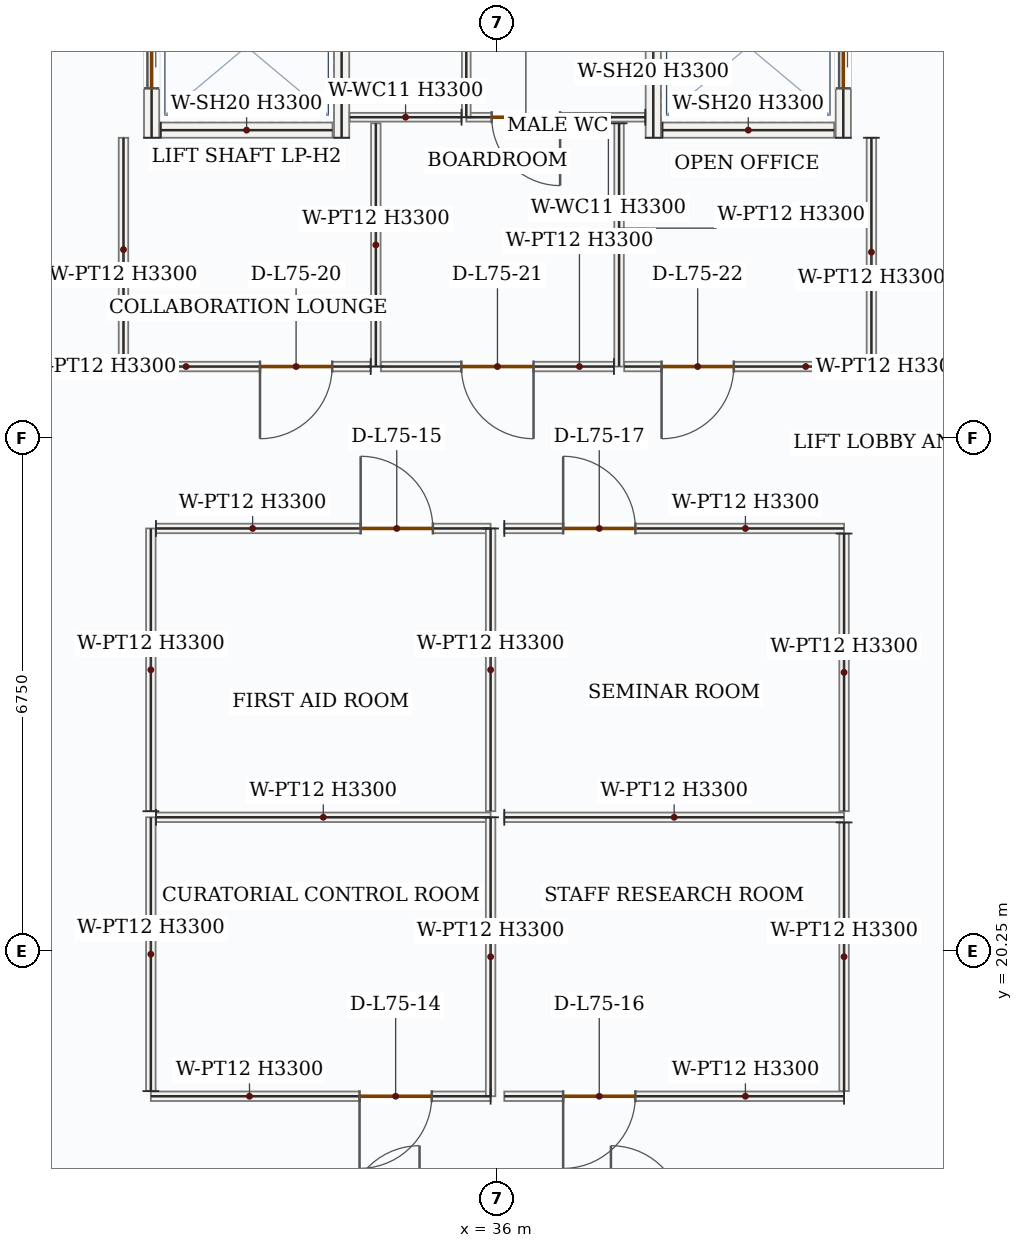
"""IFC4 building model, lengths in metres.
Left out: names, types, materials, properties, quantities, classifications, styles, units other than length and angle.
Written with IfcOpenShell. Run it as: python <this file> out.ifc"""

import sys

from ifc_helpers import new_model, si_unit, direction, frame, frame_2d, origin, place, context, subcontext, project, spatial, rectangle, extrude, source, transform, mapped, element, fill, save


model = new_model("IFC4")
c1 = context("Model", 3, precision=1e-05, world=origin(), true_north=direction((0.0, 1.0)))
c2 = subcontext(c1, "Body", "Model", "MODEL_VIEW")
j1 = project(units=[si_unit("LENGTHUNIT", "METRE"), si_unit("PLANEANGLEUNIT", "RADIAN")], contexts=[c1])
p1 = place(None, origin())
s1 = spatial("IfcSite", under=j1, at=p1, CompositionType="ELEMENT")
p2 = place(p1, origin())
s2 = spatial("IfcBuilding", under=s1, at=p2, CompositionType="ELEMENT")
p3 = place(p2, frame((0.0, 0.0, 310.35)))
s3 = spatial("IfcBuildingStorey", under=s2, at=p3, CompositionType="ELEMENT", Elevation=310.35)
p4 = place(p3, frame((31.45, 30.95, 0.0), z_axis=(0.0, 0.0, 1.0), x_axis=(0.0, 1.0, 0.0)))
e1 = element("IfcWall", 1, at=p4, inside=s3, PredefinedType="SOLIDWALL", context=c2, shape_type="SweptSolid", body=[
    extrude(rectangle(XDim=2.4, YDim=0.2, at=frame_2d((1.2, 0.0))), origin(), (0.0, 0.0, 1.0), 3.3),
])
p5 = place(p4, frame((0.65, 0.0, 0.0)))
e2 = element("IfcOpeningElement", 2, at=p5, cuts=e1, PredefinedType="OPENING", context=c2, shape_type="SweptSolid", body=[
    extrude(rectangle(XDim=1.1, YDim=2.15, at=frame_2d((0.55, 1.075))), frame((0.0, 0.11, 0.0), z_axis=(0.0, -1.0, 0.0), x_axis=(1.0, 0.0, 0.0)), (0.0, 0.0, 1.0), 0.22),
])
m1 = source(origin(), c2, "Body", "SweptSolid", [
    extrude(rectangle(XDim=2.4, YDim=0.2, at=frame_2d((1.2, 0.0))), origin(), (0.0, 0.0, 1.0), 3.3),
])
p6 = place(p3, frame((33.95, 30.95, 0.0), z_axis=(0.0, 0.0, 1.0), x_axis=(0.0, 1.0, 0.0)))
e3 = element("IfcWall", 3, at=p6, inside=s3, PredefinedType="SOLIDWALL", context=c2, shape_type="MappedRepresentation", body=[
    mapped(m1, transform((0.0, 0.0, 0.0), x_axis=(1.0, 0.0, 0.0), y_axis=(0.0, 1.0, 0.0), z_axis=(0.0, 0.0, 1.0), scale=1.0)),
])
m2 = source(origin(), c2, "Body", "SweptSolid", [
    extrude(rectangle(XDim=2.26, YDim=0.2, at=frame_2d((1.13, 0.0))), origin(), (0.0, 0.0, 1.0), 3.3),
])
p7 = place(p3, frame((31.57, 31.05, 0.0), z_axis=(0.0, 0.0, 1.0), x_axis=(1.0, 0.0, 0.0)))
e4 = element("IfcWall", 4, at=p7, inside=s3, PredefinedType="SOLIDWALL", context=c2, shape_type="MappedRepresentation", body=[
    mapped(m2, transform((0.0, 0.0, 0.0), x_axis=(1.0, 0.0, 0.0), y_axis=(0.0, 1.0, 0.0), z_axis=(0.0, 0.0, 1.0), scale=1.0)),
])
p8 = place(p3, frame((38.05, 30.95, 0.0), z_axis=(0.0, 0.0, 1.0), x_axis=(0.0, 1.0, 0.0)))
e5 = element("IfcWall", 5, at=p8, inside=s3, PredefinedType="SOLIDWALL", context=c2, shape_type="MappedRepresentation", body=[
    mapped(m1, transform((0.0, 0.0, 0.0), x_axis=(1.0, 0.0, 0.0), y_axis=(0.0, 1.0, 0.0), z_axis=(0.0, 0.0, 1.0), scale=1.0)),
])
p9 = place(p3, frame((40.55, 30.95, 0.0), z_axis=(0.0, 0.0, 1.0), x_axis=(0.0, 1.0, 0.0)))
e6 = element("IfcWall", 6, at=p9, inside=s3, PredefinedType="SOLIDWALL", context=c2, shape_type="SweptSolid", body=[
    extrude(rectangle(XDim=2.4, YDim=0.2, at=frame_2d((1.2, 0.0))), origin(), (0.0, 0.0, 1.0), 3.3),
])
p10 = place(p9, frame((0.65, 0.0, 0.0)))
e7 = element("IfcOpeningElement", 7, at=p10, cuts=e6, PredefinedType="OPENING", context=c2, shape_type="SweptSolid", body=[
    extrude(rectangle(XDim=1.1, YDim=2.15, at=frame_2d((0.55, 1.075))), frame((0.0, 0.11, 0.0), z_axis=(0.0, -1.0, 0.0), x_axis=(1.0, 0.0, 0.0)), (0.0, 0.0, 1.0), 0.22),
])
p11 = place(p3, frame((38.17, 31.05, 0.0), z_axis=(0.0, 0.0, 1.0), x_axis=(1.0, 0.0, 0.0)))
e8 = element("IfcWall", 8, at=p11, inside=s3, PredefinedType="SOLIDWALL", context=c2, shape_type="MappedRepresentation", body=[
    mapped(m2, transform((0.0, 0.0, 0.0), x_axis=(1.0, 0.0, 0.0), y_axis=(0.0, 1.0, 0.0), z_axis=(0.0, 0.0, 1.0), scale=1.0)),
])
p12 = place(p3, frame((37.945, 31.22, 0.0), z_axis=(0.0, 0.0, 1.0), x_axis=(-1.0, 0.0, 0.0)))
e9 = element("IfcWall", 9, at=p12, inside=s3, PredefinedType="PARTITIONING", context=c2, shape_type="SweptSolid", body=[
    extrude(rectangle(XDim=2.355, YDim=0.115, at=frame_2d((1.177, 0.0))), origin(), (0.0, 0.0, 1.0), 3.3),
])
p13 = place(p12, frame((1.121, 0.0, 0.0)))
e10 = element("IfcOpeningElement", 10, at=p13, cuts=e9, PredefinedType="OPENING", context=c2, shape_type="SweptSolid", body=[
    extrude(rectangle(XDim=0.9, YDim=2.1, at=frame_2d((0.45, 1.05))), frame((0.0, 0.067, 0.0), z_axis=(0.0, -1.0, 0.0), x_axis=(1.0, 0.0, 0.0)), (0.0, 0.0, 1.0), 0.135),
])
m3 = source(origin(), c2, "Body", "SweptSolid", [
    extrude(rectangle(XDim=1.96, YDim=0.115, at=frame_2d((0.98, 0.0))), origin(), (0.0, 0.0, 1.0), 3.3),
])
p14 = place(p3, frame((35.59, 31.22, 0.0), z_axis=(0.0, 0.0, 1.0), x_axis=(0.0, 1.0, 0.0)))
e11 = element("IfcWall", 11, at=p14, inside=s3, PredefinedType="PARTITIONING", context=c2, shape_type="MappedRepresentation", body=[
    mapped(m3, transform((0.0, 0.0, 0.0), x_axis=(1.0, 0.0, 0.0), y_axis=(0.0, 1.0, 0.0), z_axis=(0.0, 0.0, 1.0), scale=1.0)),
])
m4 = source(origin(), c2, "Body", "SweptSolid", [
    extrude(rectangle(XDim=1.473, YDim=0.115, at=frame_2d((0.736, 0.0))), origin(), (0.0, 0.0, 1.0), 3.3),
])
p15 = place(p3, frame((35.528, 31.22, 0.0), z_axis=(0.0, 0.0, 1.0), x_axis=(-1.0, 0.0, 0.0)))
e12 = element("IfcWall", 12, at=p15, inside=s3, PredefinedType="PARTITIONING", context=c2, shape_type="MappedRepresentation", body=[
    mapped(m4, transform((0.0, 0.0, 0.0), x_axis=(1.0, 0.0, 0.0), y_axis=(0.0, 1.0, 0.0), z_axis=(0.0, 0.0, 1.0), scale=1.0)),
])
m5 = source(origin(), c2, "Body", "SweptSolid", [
    extrude(rectangle(XDim=3.2, YDim=0.125, at=frame_2d((1.6, 0.0))), origin(), (0.0, 0.0, 1.0), 3.3),
])
for number, where, z_axis, x_axis in (
    (13, (34.4, 27.94, 0.0), (0.0, 0.0, 1.0), (0.0, 1.0, 0.0)),
    (14, (37.6, 31.14, 0.0), (0.0, 0.0, 1.0), (0.0, -1.0, 0.0)),
):
    element("IfcWall", number, at=place(p3, frame(where, z_axis=z_axis, x_axis=x_axis)), inside=s3, PredefinedType="PARTITIONING", context=c2, shape_type="MappedRepresentation", body=[
        mapped(m5, transform((0.0, 0.0, 0.0), x_axis=(1.0, 0.0, 0.0), y_axis=(0.0, 1.0, 0.0), z_axis=(0.0, 0.0, 1.0), scale=1.0)),
    ])
p16 = place(p3, frame((37.532, 27.94, 0.0), z_axis=(0.0, 0.0, 1.0), x_axis=(-1.0, 0.0, 0.0)))
e15 = element("IfcWall", 15, at=p16, inside=s3, PredefinedType="PARTITIONING", context=c2, shape_type="SweptSolid", body=[
    extrude(rectangle(XDim=3.065, YDim=0.125, at=frame_2d((1.532, 0.0))), origin(), (0.0, 0.0, 1.0), 3.3),
])
p17 = place(p16, frame((1.058, 0.0, 0.0)))
e16 = element("IfcOpeningElement", 16, at=p17, cuts=e15, PredefinedType="OPENING", context=c2, shape_type="SweptSolid", body=[
    extrude(rectangle(XDim=0.95, YDim=2.15, at=frame_2d((0.475, 1.075))), frame((0.0, 0.073, 0.0), z_axis=(0.0, -1.0, 0.0), x_axis=(1.0, 0.0, 0.0)), (0.0, 0.0, 1.0), 0.145),
])
p18 = place(p3, frame((34.333, 27.94, 0.0), z_axis=(0.0, 0.0, 1.0), x_axis=(-1.0, 0.0, 0.0)))
e17 = element("IfcWall", 17, at=p18, inside=s3, PredefinedType="PARTITIONING", context=c2, shape_type="SweptSolid", body=[
    extrude(rectangle(XDim=3.252, YDim=0.125, at=frame_2d((1.626, 0.0))), origin(), (0.0, 0.0, 1.0), 3.3),
])
p19 = place(p18, frame((0.507, 0.0, 0.0)))
e18 = element("IfcOpeningElement", 18, at=p19, cuts=e17, PredefinedType="OPENING", context=c2, shape_type="SweptSolid", body=[
    extrude(rectangle(XDim=0.95, YDim=2.15, at=frame_2d((0.475, 1.075))), frame((0.0, 0.073, 0.0), z_axis=(0.0, -1.0, 0.0), x_axis=(1.0, 0.0, 0.0)), (0.0, 0.0, 1.0), 0.145),
])
m6 = source(origin(), c2, "Body", "SweptSolid", [
    extrude(rectangle(XDim=2.942, YDim=0.125, at=frame_2d((1.471, 0.0))), origin(), (0.0, 0.0, 1.0), 3.3),
])
p20 = place(p3, frame((31.08, 28.008, 0.0), z_axis=(0.0, 0.0, 1.0), x_axis=(0.0, 1.0, 0.0)))
e19 = element("IfcWall", 19, at=p20, inside=s3, PredefinedType="PARTITIONING", context=c2, shape_type="MappedRepresentation", body=[
    mapped(m6, transform((0.0, 0.0, 0.0), x_axis=(1.0, 0.0, 0.0), y_axis=(0.0, 1.0, 0.0), z_axis=(0.0, 0.0, 1.0), scale=1.0)),
])
m7 = source(origin(), c2, "Body", "SweptSolid", [
    extrude(rectangle(XDim=3.01, YDim=0.125, at=frame_2d((1.505, 0.0))), origin(), (0.0, 0.0, 1.0), 3.3),
])
p21 = place(p3, frame((40.92, 30.95, 0.0), z_axis=(0.0, 0.0, 1.0), x_axis=(0.0, -1.0, 0.0)))
e20 = element("IfcWall", 20, at=p21, inside=s3, PredefinedType="PARTITIONING", context=c2, shape_type="MappedRepresentation", body=[
    mapped(m7, transform((0.0, 0.0, 0.0), x_axis=(1.0, 0.0, 0.0), y_axis=(0.0, 1.0, 0.0), z_axis=(0.0, 0.0, 1.0), scale=1.0)),
])
p22 = place(p3, frame((40.853, 27.94, 0.0), z_axis=(0.0, 0.0, 1.0), x_axis=(-1.0, 0.0, 0.0)))
e21 = element("IfcWall", 21, at=p22, inside=s3, PredefinedType="PARTITIONING", context=c2, shape_type="SweptSolid", body=[
    extrude(rectangle(XDim=3.185, YDim=0.125, at=frame_2d((1.593, 0.0))), origin(), (0.0, 0.0, 1.0), 3.3),
])
p23 = place(p22, frame((1.743, 0.0, 0.0)))
e22 = element("IfcOpeningElement", 22, at=p23, cuts=e21, PredefinedType="OPENING", context=c2, shape_type="SweptSolid", body=[
    extrude(rectangle(XDim=0.95, YDim=2.15, at=frame_2d((0.475, 1.075))), frame((0.0, 0.073, 0.0), z_axis=(0.0, -1.0, 0.0), x_axis=(1.0, 0.0, 0.0)), (0.0, 0.0, 1.0), 0.145),
])
p24 = place(p3, frame((35.91, 18.34, 0.0), z_axis=(0.0, 0.0, 1.0), x_axis=(-1.0, 0.0, 0.0)))
e23 = element("IfcWall", 23, at=p24, inside=s3, PredefinedType="PARTITIONING", context=c2, shape_type="SweptSolid", body=[
    extrude(rectangle(XDim=4.47, YDim=0.125, at=frame_2d((2.235, 0.0))), origin(), (0.0, 0.0, 1.0), 3.3),
])
p25 = place(p24, frame((0.774, 0.0, 0.0)))
e24 = element("IfcOpeningElement", 24, at=p25, cuts=e23, PredefinedType="OPENING", context=c2, shape_type="SweptSolid", body=[
    extrude(rectangle(XDim=0.95, YDim=2.15, at=frame_2d((0.475, 1.075))), frame((0.0, 0.073, 0.0), z_axis=(0.0, -1.0, 0.0), x_axis=(1.0, 0.0, 0.0)), (0.0, 0.0, 1.0), 0.145),
])
m8 = source(origin(), c2, "Body", "SweptSolid", [
    extrude(rectangle(XDim=3.603, YDim=0.125, at=frame_2d((1.801, 0.0))), origin(), (0.0, 0.0, 1.0), 3.3),
])
p26 = place(p3, frame((31.44, 18.407, 0.0), z_axis=(0.0, 0.0, 1.0), x_axis=(0.0, 1.0, 0.0)))
e25 = element("IfcWall", 25, at=p26, inside=s3, PredefinedType="PARTITIONING", context=c2, shape_type="MappedRepresentation", body=[
    mapped(m8, transform((0.0, 0.0, 0.0), x_axis=(1.0, 0.0, 0.0), y_axis=(0.0, 1.0, 0.0), z_axis=(0.0, 0.0, 1.0), scale=1.0)),
])
m9 = source(origin(), c2, "Body", "SweptSolid", [
    extrude(rectangle(XDim=4.402, YDim=0.125, at=frame_2d((2.201, 0.0))), origin(), (0.0, 0.0, 1.0), 3.3),
])
p27 = place(p3, frame((31.508, 22.01, 0.0), z_axis=(0.0, 0.0, 1.0), x_axis=(1.0, 0.0, 0.0)))
e26 = element("IfcWall", 26, at=p27, inside=s3, PredefinedType="PARTITIONING", context=c2, shape_type="MappedRepresentation", body=[
    mapped(m9, transform((0.0, 0.0, 0.0), x_axis=(1.0, 0.0, 0.0), y_axis=(0.0, 1.0, 0.0), z_axis=(0.0, 0.0, 1.0), scale=1.0)),
])
m10 = source(origin(), c2, "Body", "SweptSolid", [
    extrude(rectangle(XDim=3.67, YDim=0.125, at=frame_2d((1.835, 0.0))), origin(), (0.0, 0.0, 1.0), 3.3),
])
p28 = place(p3, frame((35.91, 22.01, 0.0), z_axis=(0.0, 0.0, 1.0), x_axis=(0.0, -1.0, 0.0)))
e27 = element("IfcWall", 27, at=p28, inside=s3, PredefinedType="PARTITIONING", context=c2, shape_type="MappedRepresentation", body=[
    mapped(m10, transform((0.0, 0.0, 0.0), x_axis=(1.0, 0.0, 0.0), y_axis=(0.0, 1.0, 0.0), z_axis=(0.0, 0.0, 1.0), scale=1.0)),
])
p29 = place(p3, frame((40.56, 18.34, 0.0), z_axis=(0.0, 0.0, 1.0), x_axis=(-1.0, 0.0, 0.0)))
e28 = element("IfcWall", 28, at=p29, inside=s3, PredefinedType="PARTITIONING", context=c2, shape_type="SweptSolid", body=[
    extrude(rectangle(XDim=4.47, YDim=0.125, at=frame_2d((2.235, 0.0))), origin(), (0.0, 0.0, 1.0), 3.3),
])
p30 = place(p29, frame((2.746, 0.0, 0.0)))
e29 = element("IfcOpeningElement", 29, at=p30, cuts=e28, PredefinedType="OPENING", context=c2, shape_type="SweptSolid", body=[
    extrude(rectangle(XDim=0.95, YDim=2.15, at=frame_2d((0.475, 1.075))), frame((0.0, 0.073, 0.0), z_axis=(0.0, -1.0, 0.0), x_axis=(1.0, 0.0, 0.0)), (0.0, 0.0, 1.0), 0.145),
])
m11 = source(origin(), c2, "Body", "SweptSolid", [
    extrude(rectangle(XDim=4.47, YDim=0.125, at=frame_2d((2.235, 0.0))), origin(), (0.0, 0.0, 1.0), 3.3),
])
p31 = place(p3, frame((36.09, 22.01, 0.0), z_axis=(0.0, 0.0, 1.0), x_axis=(1.0, 0.0, 0.0)))
e30 = element("IfcWall", 30, at=p31, inside=s3, PredefinedType="PARTITIONING", context=c2, shape_type="MappedRepresentation", body=[
    mapped(m11, transform((0.0, 0.0, 0.0), x_axis=(1.0, 0.0, 0.0), y_axis=(0.0, 1.0, 0.0), z_axis=(0.0, 0.0, 1.0), scale=1.0)),
])
m12 = source(origin(), c2, "Body", "SweptSolid", [
    extrude(rectangle(XDim=3.535, YDim=0.125, at=frame_2d((1.768, 0.0))), origin(), (0.0, 0.0, 1.0), 3.3),
])
p32 = place(p3, frame((40.56, 21.942, 0.0), z_axis=(0.0, 0.0, 1.0), x_axis=(0.0, -1.0, 0.0)))
e31 = element("IfcWall", 31, at=p32, inside=s3, PredefinedType="PARTITIONING", context=c2, shape_type="MappedRepresentation", body=[
    mapped(m12, transform((0.0, 0.0, 0.0), x_axis=(1.0, 0.0, 0.0), y_axis=(0.0, 1.0, 0.0), z_axis=(0.0, 0.0, 1.0), scale=1.0)),
])
m13 = source(origin(), c2, "Body", "SweptSolid", [
    extrude(rectangle(XDim=3.72, YDim=0.125, at=frame_2d((1.86, 0.0))), origin(), (0.0, 0.0, 1.0), 3.3),
])
p33 = place(p3, frame((31.44, 22.09, 0.0), z_axis=(0.0, 0.0, 1.0), x_axis=(0.0, 1.0, 0.0)))
e32 = element("IfcWall", 32, at=p33, inside=s3, PredefinedType="PARTITIONING", context=c2, shape_type="MappedRepresentation", body=[
    mapped(m13, transform((0.0, 0.0, 0.0), x_axis=(1.0, 0.0, 0.0), y_axis=(0.0, 1.0, 0.0), z_axis=(0.0, 0.0, 1.0), scale=1.0)),
])
p34 = place(p3, frame((31.508, 25.81, 0.0), z_axis=(0.0, 0.0, 1.0), x_axis=(1.0, 0.0, 0.0)))
e33 = element("IfcWall", 33, at=p34, inside=s3, PredefinedType="PARTITIONING", context=c2, shape_type="SweptSolid", body=[
    extrude(rectangle(XDim=4.402, YDim=0.125, at=frame_2d((2.201, 0.0))), origin(), (0.0, 0.0, 1.0), 3.3),
])
p35 = place(p34, frame((2.693, 0.0, 0.0)))
e34 = element("IfcOpeningElement", 34, at=p35, cuts=e33, PredefinedType="OPENING", context=c2, shape_type="SweptSolid", body=[
    extrude(rectangle(XDim=0.95, YDim=2.15, at=frame_2d((0.475, 1.075))), frame((0.0, 0.073, 0.0), z_axis=(0.0, -1.0, 0.0), x_axis=(1.0, 0.0, 0.0)), (0.0, 0.0, 1.0), 0.145),
])
p36 = place(p3, frame((35.91, 25.81, 0.0), z_axis=(0.0, 0.0, 1.0), x_axis=(0.0, -1.0, 0.0)))
e35 = element("IfcWall", 35, at=p36, inside=s3, PredefinedType="PARTITIONING", context=c2, shape_type="MappedRepresentation", body=[
    mapped(m13, transform((0.0, 0.0, 0.0), x_axis=(1.0, 0.0, 0.0), y_axis=(0.0, 1.0, 0.0), z_axis=(0.0, 0.0, 1.0), scale=1.0)),
])
p37 = place(p3, frame((36.09, 25.81, 0.0), z_axis=(0.0, 0.0, 1.0), x_axis=(1.0, 0.0, 0.0)))
e36 = element("IfcWall", 36, at=p37, inside=s3, PredefinedType="PARTITIONING", context=c2, shape_type="SweptSolid", body=[
    extrude(rectangle(XDim=4.47, YDim=0.125, at=frame_2d((2.235, 0.0))), origin(), (0.0, 0.0, 1.0), 3.3),
])
p38 = place(p37, frame((0.774, 0.0, 0.0)))
e37 = element("IfcOpeningElement", 37, at=p38, cuts=e36, PredefinedType="OPENING", context=c2, shape_type="SweptSolid", body=[
    extrude(rectangle(XDim=0.95, YDim=2.15, at=frame_2d((0.475, 1.075))), frame((0.0, 0.073, 0.0), z_axis=(0.0, -1.0, 0.0), x_axis=(1.0, 0.0, 0.0)), (0.0, 0.0, 1.0), 0.145),
])
m14 = source(origin(), c2, "Body", "SweptSolid", [
    extrude(rectangle(XDim=3.652, YDim=0.125, at=frame_2d((1.826, 0.0))), origin(), (0.0, 0.0, 1.0), 3.3),
])
p39 = place(p3, frame((40.56, 25.742, 0.0), z_axis=(0.0, 0.0, 1.0), x_axis=(0.0, -1.0, 0.0)))
e38 = element("IfcWall", 38, at=p39, inside=s3, PredefinedType="PARTITIONING", context=c2, shape_type="MappedRepresentation", body=[
    mapped(m14, transform((0.0, 0.0, 0.0), x_axis=(1.0, 0.0, 0.0), y_axis=(0.0, 1.0, 0.0), z_axis=(0.0, 0.0, 1.0), scale=1.0)),
])
m15 = source(origin(), c2, "Body", "SweptSolid", [
    extrude(rectangle(XDim=1.1, YDim=2.15, at=frame_2d((0.55, 1.075))), frame((0.0, 0.025, 0.0), z_axis=(0.0, -1.0, 0.0), x_axis=(1.0, 0.0, 0.0)), (0.0, 0.0, 1.0), 0.05),
])
p40 = place(p5, origin())
e39 = element("IfcDoor", 39, at=p40, inside=s3, OperationType="DOUBLE_DOOR_SLIDING", PredefinedType="DOOR", context=c2, shape_type="MappedRepresentation", body=[
    mapped(m15, transform((0.0, 0.0, 0.0), x_axis=(1.0, 0.0, 0.0), y_axis=(0.0, 1.0, 0.0), z_axis=(0.0, 0.0, 1.0), scale=1.0)),
])
fill(e2, e39)
p41 = place(p10, origin())
e40 = element("IfcDoor", 40, at=p41, inside=s3, OperationType="DOUBLE_DOOR_SLIDING", PredefinedType="DOOR", context=c2, shape_type="MappedRepresentation", body=[
    mapped(m15, transform((0.0, 0.0, 0.0), x_axis=(1.0, 0.0, 0.0), y_axis=(0.0, 1.0, 0.0), z_axis=(0.0, 0.0, 1.0), scale=1.0)),
])
fill(e7, e40)
m16 = source(origin(), c2, "Body", "SweptSolid", [
    extrude(rectangle(XDim=0.95, YDim=2.15, at=frame_2d((0.475, 1.075))), frame((0.0, 0.025, 0.0), z_axis=(0.0, -1.0, 0.0), x_axis=(1.0, 0.0, 0.0)), (0.0, 0.0, 1.0), 0.05),
])
p42 = place(p25, origin())
e41 = element("IfcDoor", 41, at=p42, inside=s3, OperationType="SINGLE_SWING_RIGHT", PredefinedType="DOOR", context=c2, shape_type="MappedRepresentation", body=[
    mapped(m16, transform((0.0, 0.0, 0.0), x_axis=(1.0, 0.0, 0.0), y_axis=(0.0, 1.0, 0.0), z_axis=(0.0, 0.0, 1.0), scale=1.0)),
])
fill(e24, e41)
p43 = place(p35, origin())
e42 = element("IfcDoor", 42, at=p43, inside=s3, OperationType="SINGLE_SWING_LEFT", PredefinedType="DOOR", context=c2, shape_type="MappedRepresentation", body=[
    mapped(m16, transform((0.0, 0.0, 0.0), x_axis=(1.0, 0.0, 0.0), y_axis=(0.0, 1.0, 0.0), z_axis=(0.0, 0.0, 1.0), scale=1.0)),
])
fill(e34, e42)
p44 = place(p30, origin())
e43 = element("IfcDoor", 43, at=p44, inside=s3, OperationType="SINGLE_SWING_RIGHT", PredefinedType="DOOR", context=c2, shape_type="MappedRepresentation", body=[
    mapped(m16, transform((0.0, 0.0, 0.0), x_axis=(1.0, 0.0, 0.0), y_axis=(0.0, 1.0, 0.0), z_axis=(0.0, 0.0, 1.0), scale=1.0)),
])
fill(e29, e43)
p45 = place(p38, origin())
e44 = element("IfcDoor", 44, at=p45, inside=s3, OperationType="SINGLE_SWING_LEFT", PredefinedType="DOOR", context=c2, shape_type="MappedRepresentation", body=[
    mapped(m16, transform((0.0, 0.0, 0.0), x_axis=(1.0, 0.0, 0.0), y_axis=(0.0, 1.0, 0.0), z_axis=(0.0, 0.0, 1.0), scale=1.0)),
])
fill(e37, e44)
p46 = place(p19, origin())
e45 = element("IfcDoor", 45, at=p46, inside=s3, OperationType="SINGLE_SWING_RIGHT", PredefinedType="DOOR", context=c2, shape_type="MappedRepresentation", body=[
    mapped(m16, transform((0.0, 0.0, 0.0), x_axis=(1.0, 0.0, 0.0), y_axis=(0.0, 1.0, 0.0), z_axis=(0.0, 0.0, 1.0), scale=1.0)),
])
fill(e18, e45)
p47 = place(p17, origin())
e46 = element("IfcDoor", 46, at=p47, inside=s3, OperationType="SINGLE_SWING_LEFT", PredefinedType="DOOR", context=c2, shape_type="MappedRepresentation", body=[
    mapped(m16, transform((0.0, 0.0, 0.0), x_axis=(1.0, 0.0, 0.0), y_axis=(0.0, 1.0, 0.0), z_axis=(0.0, 0.0, 1.0), scale=1.0)),
])
fill(e16, e46)
p48 = place(p23, origin())
e47 = element("IfcDoor", 47, at=p48, inside=s3, OperationType="SINGLE_SWING_RIGHT", PredefinedType="DOOR", context=c2, shape_type="MappedRepresentation", body=[
    mapped(m16, transform((0.0, 0.0, 0.0), x_axis=(1.0, 0.0, 0.0), y_axis=(0.0, 1.0, 0.0), z_axis=(0.0, 0.0, 1.0), scale=1.0)),
])
fill(e22, e47)
m17 = source(origin(), c2, "Body", "SweptSolid", [
    extrude(rectangle(XDim=0.9, YDim=2.1, at=frame_2d((0.45, 1.05))), frame((0.0, 0.025, 0.0), z_axis=(0.0, -1.0, 0.0), x_axis=(1.0, 0.0, 0.0)), (0.0, 0.0, 1.0), 0.05),
])
p49 = place(p13, origin())
e48 = element("IfcDoor", 48, at=p49, inside=s3, OperationType="SINGLE_SWING_LEFT", PredefinedType="DOOR", context=c2, shape_type="MappedRepresentation", body=[
    mapped(m17, transform((0.0, 0.0, 0.0), x_axis=(1.0, 0.0, 0.0), y_axis=(0.0, 1.0, 0.0), z_axis=(0.0, 0.0, 1.0), scale=1.0)),
])
fill(e10, e48)
save(model, sys.argv[1])
